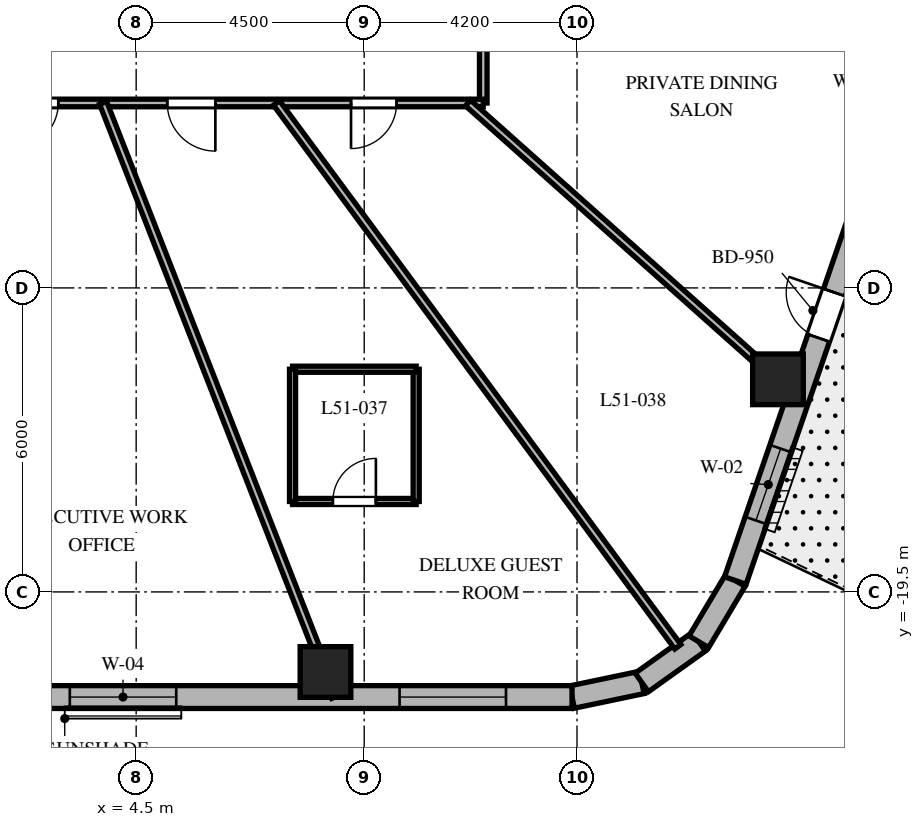
"""IFC4 building model, lengths in metres.
Left out: names, types, materials, properties, quantities, classifications, styles, units other than length and angle.
Written with IfcOpenShell. Run it as: python <this file> out.ifc"""

import sys

from ifc_helpers import new_model, si_unit, direction, frame, frame_2d, origin, origin_2d, place, context, subcontext, project, spatial, rectangle, extrude, element, fill, save


model = new_model("IFC4")
c1 = context("Model", 3, precision=1e-05, world=origin(), true_north=direction((0.0, 1.0)))
c2 = subcontext(c1, "Body", "Model", "MODEL_VIEW")
j1 = project(units=[si_unit("LENGTHUNIT", "METRE"), si_unit("PLANEANGLEUNIT", "RADIAN")], contexts=[c1])
p1 = place(None, origin())
s1 = spatial("IfcSite", under=j1, at=p1, CompositionType="ELEMENT")
p2 = place(p1, origin())
s2 = spatial("IfcBuilding", under=s1, at=p2, CompositionType="ELEMENT")
p3 = place(p2, frame((0.0, 0.0, 206.5)))
s3 = spatial("IfcBuildingStorey", under=s2, at=p3, CompositionType="ELEMENT", Elevation=206.5)
for number, where, z_axis, x_axis in (
    (1, (8.236, -21.08, 0.0), (0.0, 0.0, 1.0), (1.0, 0.0, 0.0)),
    (2, (17.166, -15.304, 0.0), (0.0, 0.0, 1.0), (1.0, 0.0, 0.0)),
):
    element("IfcColumn", number, at=place(p3, frame(where, z_axis=z_axis, x_axis=x_axis)), inside=s3, PredefinedType="COLUMN", context=c2, shape_type="SweptSolid", body=[
        extrude(rectangle(XDim=1.0, YDim=1.0, at=origin_2d()), origin(), (0.0, 0.0, 1.0), 3.8),
    ])
p4 = place(p3, frame((13.102, -21.575, 0.0), z_axis=(0.0, 0.0, 1.0), x_axis=(0.978757421505, 0.205021730188, 0.0)))
e3 = element("IfcWall", 3, at=p4, inside=s3, PredefinedType="SOLIDWALL", context=c2, shape_type="SweptSolid", body=[
    extrude(rectangle(XDim=1.406, YDim=0.45, at=frame_2d((0.703, 0.0))), origin(), (0.0, 0.0, 1.0), 3.5),
])
p5 = place(p3, frame((14.478, -21.287, 0.0), z_axis=(0.0, 0.0, 1.0), x_axis=(0.813888518617, 0.58102106611, 0.0)))
e4 = element("IfcWall", 4, at=p5, inside=s3, PredefinedType="SOLIDWALL", context=c2, shape_type="SweptSolid", body=[
    extrude(rectangle(XDim=1.383, YDim=0.45, at=frame_2d((0.691, 0.0))), origin(), (0.0, 0.0, 1.0), 3.5),
])
p6 = place(p3, frame((15.604, -20.483, 0.0), z_axis=(0.0, 0.0, 1.0), x_axis=(0.512222149036, 0.858852996756, 0.0)))
e5 = element("IfcWall", 5, at=p6, inside=s3, PredefinedType="SOLIDWALL", context=c2, shape_type="SweptSolid", body=[
    extrude(rectangle(XDim=1.406, YDim=0.45, at=frame_2d((0.703, 0.0))), origin(), (0.0, 0.0, 1.0), 3.5),
])
p7 = place(p3, frame((-11.298, -21.575, 0.0), z_axis=(0.0, 0.0, 1.0), x_axis=(1.0, 0.0, 0.0)))
e6 = element("IfcWall", 6, at=p7, inside=s3, PredefinedType="SOLIDWALL", context=c2, shape_type="SweptSolid", body=[
    extrude(rectangle(XDim=24.399, YDim=0.45, at=frame_2d((12.2, 0.0))), origin(), (0.0, 0.0, 1.0), 3.5),
])
p8 = place(p7, frame((1.304, 0.0, 0.8)))
e7 = element("IfcOpeningElement", 7, at=p8, cuts=e6, PredefinedType="OPENING", context=c2, shape_type="SweptSolid", body=[
    extrude(rectangle(XDim=2.1, YDim=1.85, at=frame_2d((1.05, 0.925))), frame((0.0, 0.235, 0.0), z_axis=(0.0, -1.0, 0.0), x_axis=(1.0, 0.0, 0.0)), (0.0, 0.0, 1.0), 0.47),
])
p9 = place(p7, frame((7.735, 0.0, 0.8)))
e8 = element("IfcOpeningElement", 8, at=p9, cuts=e6, PredefinedType="OPENING", context=c2, shape_type="SweptSolid", body=[
    extrude(rectangle(XDim=2.1, YDim=1.85, at=frame_2d((1.05, 0.925))), frame((0.0, 0.235, 0.0), z_axis=(0.0, -1.0, 0.0), x_axis=(1.0, 0.0, 0.0)), (0.0, 0.0, 1.0), 0.47),
])
p10 = place(p7, frame((14.488, 0.0, 0.8)))
e9 = element("IfcOpeningElement", 9, at=p10, cuts=e6, PredefinedType="OPENING", context=c2, shape_type="SweptSolid", body=[
    extrude(rectangle(XDim=2.1, YDim=1.85, at=frame_2d((1.05, 0.925))), frame((0.0, 0.235, 0.0), z_axis=(0.0, -1.0, 0.0), x_axis=(1.0, 0.0, 0.0)), (0.0, 0.0, 1.0), 0.47),
])
p11 = place(p7, frame((20.996, 0.0, 0.8)))
e10 = element("IfcOpeningElement", 10, at=p11, cuts=e6, PredefinedType="OPENING", context=c2, shape_type="SweptSolid", body=[
    extrude(rectangle(XDim=2.1, YDim=1.85, at=frame_2d((1.05, 0.925))), frame((0.0, 0.235, 0.0), z_axis=(0.0, -1.0, 0.0), x_axis=(1.0, 0.0, 0.0)), (0.0, 0.0, 1.0), 0.47),
])
p12 = place(p3, frame((16.324, -19.275, 0.0), z_axis=(0.0, 0.0, 1.0), x_axis=(0.325083142304, 0.945685439557, 0.0)))
e11 = element("IfcWall", 11, at=p12, inside=s3, PredefinedType="SOLIDWALL", context=c2, shape_type="SweptSolid", body=[
    extrude(rectangle(XDim=20.224, YDim=0.45, at=frame_2d((10.112, 0.0))), origin(), (0.0, 0.0, 1.0), 3.5),
])
p13 = place(p12, frame((5.062, 0.0, 0.0)))
e12 = element("IfcOpeningElement", 12, at=p13, cuts=e11, PredefinedType="OPENING", context=c2, shape_type="SweptSolid", body=[
    extrude(rectangle(XDim=0.95, YDim=2.15, at=frame_2d((0.475, 1.075))), frame((0.0, 0.235, 0.0), z_axis=(0.0, -1.0, 0.0), x_axis=(1.0, 0.0, 0.0)), (0.0, 0.0, 1.0), 0.47),
])
p14 = place(p12, frame((1.253, 0.0, 0.8)))
e13 = element("IfcOpeningElement", 13, at=p14, cuts=e11, PredefinedType="OPENING", context=c2, shape_type="SweptSolid", body=[
    extrude(rectangle(XDim=1.5, YDim=1.8, at=frame_2d((0.75, 0.9))), frame((0.0, 0.235, 0.0), z_axis=(0.0, -1.0, 0.0), x_axis=(1.0, 0.0, 0.0)), (0.0, 0.0, 1.0), 0.47),
])
p15 = place(p12, frame((9.309, 0.0, 0.8)))
e14 = element("IfcOpeningElement", 14, at=p15, cuts=e11, PredefinedType="OPENING", context=c2, shape_type="SweptSolid", body=[
    extrude(rectangle(XDim=1.5, YDim=1.8, at=frame_2d((0.75, 0.9))), frame((0.0, 0.235, 0.0), z_axis=(0.0, -1.0, 0.0), x_axis=(1.0, 0.0, 0.0)), (0.0, 0.0, 1.0), 0.47),
])
p16 = place(p12, frame((17.418, 0.0, 0.8)))
e15 = element("IfcOpeningElement", 15, at=p16, cuts=e11, PredefinedType="OPENING", context=c2, shape_type="SweptSolid", body=[
    extrude(rectangle(XDim=1.5, YDim=1.8, at=frame_2d((0.75, 0.9))), frame((0.0, 0.235, 0.0), z_axis=(0.0, -1.0, 0.0), x_axis=(1.0, 0.0, 0.0)), (0.0, 0.0, 1.0), 0.47),
])
p17 = place(p3, frame((11.35, -4.4, 0.0), z_axis=(0.0, 0.0, 1.0), x_axis=(0.0, -1.0, 0.0)))
e16 = element("IfcWall", 16, at=p17, inside=s3, PredefinedType="PARTITIONING", context=c2, shape_type="SweptSolid", body=[
    extrude(rectangle(XDim=5.45, YDim=0.15, at=frame_2d((2.725, 0.0))), origin(), (0.0, 0.0, 1.0), 2.99),
])
p18 = place(p3, frame((11.35, -9.85, 0.0), z_axis=(0.0, 0.0, 1.0), x_axis=(-1.0, 0.0, 0.0)))
e17 = element("IfcWall", 17, at=p18, inside=s3, PredefinedType="PARTITIONING", context=c2, shape_type="SweptSolid", body=[
    extrude(rectangle(XDim=10.43, YDim=0.15, at=frame_2d((5.215, 0.0))), origin(), (0.0, 0.0, 1.0), 2.99),
])
p19 = place(p18, frame((8.387, 0.0, 0.0)))
e18 = element("IfcOpeningElement", 18, at=p19, cuts=e17, PredefinedType="OPENING", context=c2, shape_type="SweptSolid", body=[
    extrude(rectangle(XDim=0.9, YDim=2.03, at=frame_2d((0.45, 1.015))), frame((0.0, 0.085, 0.0), z_axis=(0.0, -1.0, 0.0), x_axis=(1.0, 0.0, 0.0)), (0.0, 0.0, 1.0), 0.17),
])
p20 = place(p18, frame((5.287, 0.0, 0.0)))
e19 = element("IfcOpeningElement", 19, at=p20, cuts=e17, PredefinedType="OPENING", context=c2, shape_type="SweptSolid", body=[
    extrude(rectangle(XDim=0.95, YDim=2.03, at=frame_2d((0.475, 1.015))), frame((0.0, 0.085, 0.0), z_axis=(0.0, -1.0, 0.0), x_axis=(1.0, 0.0, 0.0)), (0.0, 0.0, 1.0), 0.17),
])
p21 = place(p18, frame((1.71, 0.0, 0.0)))
e20 = element("IfcOpeningElement", 20, at=p21, cuts=e17, PredefinedType="OPENING", context=c2, shape_type="SweptSolid", body=[
    extrude(rectangle(XDim=0.9, YDim=2.03, at=frame_2d((0.45, 1.015))), frame((0.0, 0.085, 0.0), z_axis=(0.0, -1.0, 0.0), x_axis=(1.0, 0.0, 0.0)), (0.0, 0.0, 1.0), 0.17),
])
p22 = place(p3, frame((3.848, -9.85, 0.0), z_axis=(0.0, 0.0, 1.0), x_axis=(0.363921778212, -0.931429513889, 0.0)))
e21 = element("IfcWall", 21, at=p22, inside=s3, PredefinedType="PARTITIONING", context=c2, shape_type="SweptSolid", body=[
    extrude(rectangle(XDim=12.588, YDim=0.15, at=frame_2d((6.294, 0.0))), origin(), (0.0, 0.0, 1.0), 2.74),
])
p23 = place(p3, frame((7.269, -9.85, 0.0), z_axis=(0.0, 0.0, 1.0), x_axis=(0.593814492791, -0.8046019812, 0.0)))
e22 = element("IfcWall", 22, at=p23, inside=s3, PredefinedType="PARTITIONING", context=c2, shape_type="SweptSolid", body=[
    extrude(rectangle(XDim=13.338, YDim=0.15, at=frame_2d((6.669, 0.0))), origin(), (0.0, 0.0, 1.0), 2.74),
])
p24 = place(p3, frame((11.048, -9.85, 0.0), z_axis=(0.0, 0.0, 1.0), x_axis=(0.746444434655, -0.665447748492, 0.0)))
e23 = element("IfcWall", 23, at=p24, inside=s3, PredefinedType="PARTITIONING", context=c2, shape_type="SweptSolid", body=[
    extrude(rectangle(XDim=8.732, YDim=0.15, at=frame_2d((4.366, 0.0))), origin(), (0.0, 0.0, 1.0), 2.74),
])
p25 = place(p3, frame((7.586, -17.715, 0.0), z_axis=(0.0, 0.0, 1.0), x_axis=(1.0, 0.0, 0.0)))
e24 = element("IfcWall", 24, at=p25, inside=s3, PredefinedType="PARTITIONING", context=c2, shape_type="SweptSolid", body=[
    extrude(rectangle(XDim=2.44, YDim=0.12, at=frame_2d((1.22, 0.0))), origin(), (0.0, 0.0, 1.0), 2.99),
])
p26 = place(p25, frame((0.795, 0.0, 0.0)))
e25 = element("IfcOpeningElement", 25, at=p26, cuts=e24, PredefinedType="OPENING", context=c2, shape_type="SweptSolid", body=[
    extrude(rectangle(XDim=0.85, YDim=2.03, at=frame_2d((0.425, 1.015))), frame((0.0, 0.07, 0.0), z_axis=(0.0, -1.0, 0.0), x_axis=(1.0, 0.0, 0.0)), (0.0, 0.0, 1.0), 0.14),
])
p27 = place(p3, frame((10.026, -17.715, 0.0), z_axis=(0.0, 0.0, 1.0), x_axis=(0.0, 1.0, 0.0)))
e26 = element("IfcWall", 26, at=p27, inside=s3, PredefinedType="PARTITIONING", context=c2, shape_type="SweptSolid", body=[
    extrude(rectangle(XDim=2.61, YDim=0.12, at=frame_2d((1.305, 0.0))), origin(), (0.0, 0.0, 1.0), 3.027),
])
p28 = place(p3, frame((10.026, -15.105, 0.0), z_axis=(0.0, 0.0, 1.0), x_axis=(-1.0, 0.0, 0.0)))
e27 = element("IfcWall", 27, at=p28, inside=s3, PredefinedType="PARTITIONING", context=c2, shape_type="SweptSolid", body=[
    extrude(rectangle(XDim=2.44, YDim=0.12, at=frame_2d((1.22, 0.0))), origin(), (0.0, 0.0, 1.0), 2.99),
])
p29 = place(p3, frame((7.586, -15.105, 0.0), z_axis=(0.0, 0.0, 1.0), x_axis=(0.0, -1.0, 0.0)))
e28 = element("IfcWall", 28, at=p29, inside=s3, PredefinedType="PARTITIONING", context=c2, shape_type="SweptSolid", body=[
    extrude(rectangle(XDim=2.61, YDim=0.12, at=frame_2d((1.305, 0.0))), origin(), (0.0, 0.0, 1.0), 2.94),
])
p30 = place(p10, origin())
e29 = element("IfcWindow", 29, at=p30, inside=s3, PartitioningType="SINGLE_PANEL", PredefinedType="WINDOW", context=c2, shape_type="SweptSolid", body=[
    extrude(rectangle(XDim=2.1, YDim=1.85, at=frame_2d((1.05, 0.925))), frame((0.0, 0.03, 0.0), z_axis=(0.0, -1.0, 0.0), x_axis=(1.0, 0.0, 0.0)), (0.0, 0.0, 1.0), 0.06),
])
fill(e9, e29)
p31 = place(p11, origin())
e30 = element("IfcWindow", 30, at=p31, inside=s3, PartitioningType="SINGLE_PANEL", PredefinedType="WINDOW", context=c2, shape_type="SweptSolid", body=[
    extrude(rectangle(XDim=2.1, YDim=1.85, at=frame_2d((1.05, 0.925))), frame((0.0, 0.03, 0.0), z_axis=(0.0, -1.0, 0.0), x_axis=(1.0, 0.0, 0.0)), (0.0, 0.0, 1.0), 0.06),
])
fill(e10, e30)
p32 = place(p13, origin())
e31 = element("IfcDoor", 31, at=p32, inside=s3, OperationType="SINGLE_SWING_RIGHT", PredefinedType="DOOR", context=c2, shape_type="SweptSolid", body=[
    extrude(rectangle(XDim=0.95, YDim=2.15, at=frame_2d((0.475, 1.075))), frame((0.0, 0.025, 0.0), z_axis=(0.0, -1.0, 0.0), x_axis=(1.0, 0.0, 0.0)), (0.0, 0.0, 1.0), 0.05),
])
fill(e12, e31)
p33 = place(p14, origin())
e32 = element("IfcWindow", 32, at=p33, inside=s3, PartitioningType="SINGLE_PANEL", PredefinedType="WINDOW", context=c2, shape_type="SweptSolid", body=[
    extrude(rectangle(XDim=1.5, YDim=1.8, at=frame_2d((0.75, 0.9))), frame((0.0, 0.03, 0.0), z_axis=(0.0, -1.0, 0.0), x_axis=(1.0, 0.0, 0.0)), (0.0, 0.0, 1.0), 0.06),
])
fill(e13, e32)
p34 = place(p19, origin())
e33 = element("IfcDoor", 33, at=p34, inside=s3, OperationType="SINGLE_SWING_RIGHT", PredefinedType="DOOR", context=c2, shape_type="SweptSolid", body=[
    extrude(rectangle(XDim=0.9, YDim=2.03, at=frame_2d((0.45, 1.015))), frame((0.0, 0.025, 0.0), z_axis=(0.0, -1.0, 0.0), x_axis=(1.0, 0.0, 0.0)), (0.0, 0.0, 1.0), 0.05),
])
fill(e18, e33)
p35 = place(p20, origin())
e34 = element("IfcDoor", 34, at=p35, inside=s3, OperationType="SINGLE_SWING_LEFT", PredefinedType="DOOR", context=c2, shape_type="SweptSolid", body=[
    extrude(rectangle(XDim=0.95, YDim=2.03, at=frame_2d((0.475, 1.015))), frame((0.0, 0.025, 0.0), z_axis=(0.0, -1.0, 0.0), x_axis=(1.0, 0.0, 0.0)), (0.0, 0.0, 1.0), 0.05),
])
fill(e19, e34)
p36 = place(p26, origin())
e35 = element("IfcDoor", 35, at=p36, inside=s3, OperationType="SINGLE_SWING_RIGHT", PredefinedType="DOOR", context=c2, shape_type="SweptSolid", body=[
    extrude(rectangle(XDim=0.85, YDim=2.03, at=frame_2d((0.425, 1.015))), frame((0.0, 0.025, 0.0), z_axis=(0.0, -1.0, 0.0), x_axis=(1.0, 0.0, 0.0)), (0.0, 0.0, 1.0), 0.05),
])
fill(e25, e35)
p37 = place(p21, origin())
e36 = element("IfcDoor", 36, at=p37, inside=s3, OperationType="SINGLE_SWING_RIGHT", PredefinedType="DOOR", context=c2, shape_type="SweptSolid", body=[
    extrude(rectangle(XDim=0.9, YDim=2.03, at=frame_2d((0.45, 1.015))), frame((0.0, 0.025, 0.0), z_axis=(0.0, -1.0, 0.0), x_axis=(1.0, 0.0, 0.0)), (0.0, 0.0, 1.0), 0.05),
])
fill(e20, e36)
save(model, sys.argv[1])
